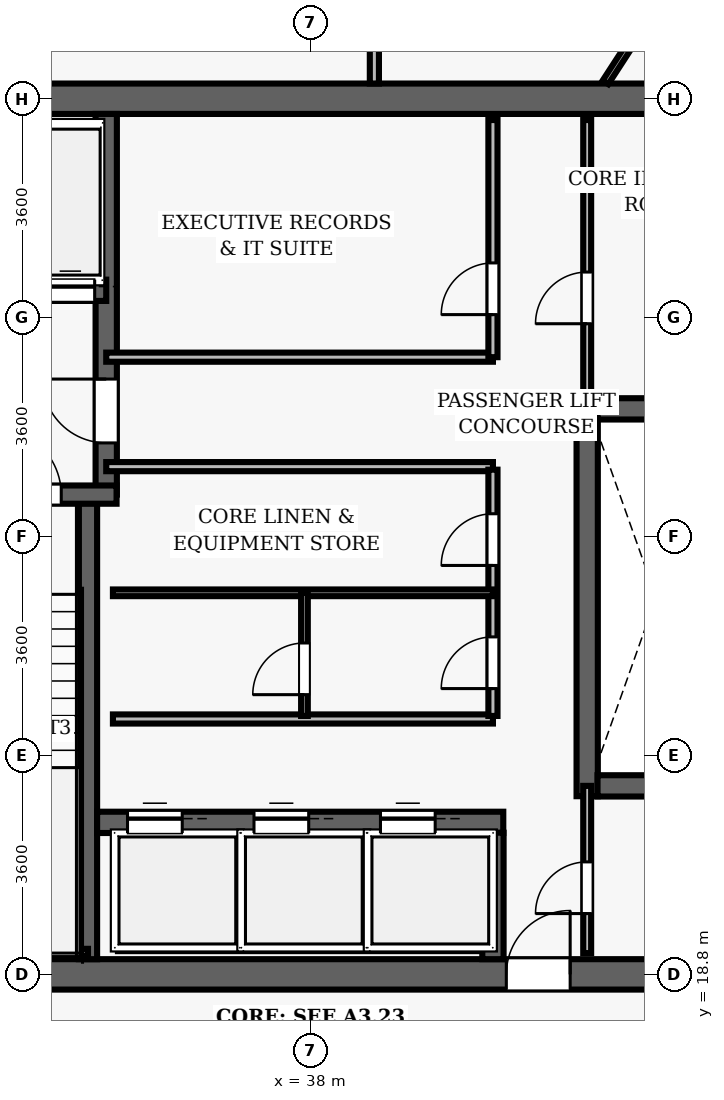
"""IFC4 building model, lengths in metres.
Left out: names, types, materials, properties, quantities, classifications, styles, units other than length and angle.
Written with IfcOpenShell. Run it as: python <this file> out.ifc"""

import sys

from ifc_helpers import new_model, si_unit, direction, frame, frame_2d, origin, place, context, subcontext, project, spatial, rectangle, extrude, element, fill, save


model = new_model("IFC4")
c1 = context("Model", 3, precision=1e-05, world=origin(), true_north=direction((0.0, 1.0)))
c2 = subcontext(c1, "Body", "Model", "MODEL_VIEW")
j1 = project(units=[si_unit("LENGTHUNIT", "METRE"), si_unit("PLANEANGLEUNIT", "RADIAN")], contexts=[c1])
p1 = place(None, origin())
s1 = spatial("IfcSite", under=j1, at=p1, CompositionType="ELEMENT")
p2 = place(p1, origin())
s2 = spatial("IfcBuilding", under=s1, at=p2, CompositionType="ELEMENT")
p3 = place(p2, frame((0.0, 0.0, 217.4)))
s3 = spatial("IfcBuildingStorey", under=s2, at=p3, CompositionType="ELEMENT", Elevation=217.4)
p4 = place(p3, frame((26.75, 18.8, 0.0), z_axis=(0.0, 0.0, 1.0), x_axis=(1.0, 0.0, 0.0)))
e1 = element("IfcWall", 1, at=p4, inside=s3, PredefinedType="SHEAR", context=c2, shape_type="SweptSolid", body=[
    extrude(rectangle(XDim=22.5, YDim=0.5, at=frame_2d((11.25, 0.0))), origin(), (0.0, 0.0, 1.0), 3.85),
])
p5 = place(p4, frame((14.47, 0.0, 0.0)))
e2 = element("IfcOpeningElement", 2, at=p5, cuts=e1, PredefinedType="OPENING", context=c2, shape_type="SweptSolid", body=[
    extrude(rectangle(XDim=1.05, YDim=2.15, at=frame_2d((0.525, 1.075))), frame((0.0, 0.26, 0.0), z_axis=(0.0, -1.0, 0.0), x_axis=(1.0, 0.0, 0.0)), (0.0, 0.0, 1.0), 0.52),
])
p6 = place(p3, frame((26.75, 33.2, 0.0), z_axis=(0.0, 0.0, 1.0), x_axis=(1.0, 0.0, 0.0)))
e3 = element("IfcWall", 3, at=p6, inside=s3, PredefinedType="SHEAR", context=c2, shape_type="SweptSolid", body=[
    extrude(rectangle(XDim=22.5, YDim=0.5, at=frame_2d((11.25, 0.0))), origin(), (0.0, 0.0, 1.0), 3.85),
])
p7 = place(p3, frame((34.34, 19.05, 0.0), z_axis=(0.0, 0.0, 1.0), x_axis=(0.0, 1.0, 0.0)))
e4 = element("IfcWall", 4, at=p7, inside=s3, PredefinedType="SHEAR", context=c2, shape_type="SweptSolid", body=[
    extrude(rectangle(XDim=7.5, YDim=0.3, at=frame_2d((3.75, 0.0))), origin(), (0.0, 0.0, 1.0), 3.85),
])
p8 = place(p3, frame((34.64, 26.69, 0.0), z_axis=(0.0, 0.0, 1.0), x_axis=(0.0, 1.0, 0.0)))
e5 = element("IfcWall", 5, at=p8, inside=s3, PredefinedType="SHEAR", context=c2, shape_type="SweptSolid", body=[
    extrude(rectangle(XDim=6.26, YDim=0.35, at=frame_2d((3.13, 0.0))), origin(), (0.0, 0.0, 1.0), 3.85),
])
p9 = place(p8, frame((0.85, 0.0, 0.0)))
e6 = element("IfcOpeningElement", 6, at=p9, cuts=e5, PredefinedType="OPENING", context=c2, shape_type="SweptSolid", body=[
    extrude(rectangle(XDim=1.05, YDim=2.15, at=frame_2d((0.525, 1.075))), frame((0.0, 0.185, 0.0), z_axis=(0.0, -1.0, 0.0), x_axis=(1.0, 0.0, 0.0)), (0.0, 0.0, 1.0), 0.37),
])
p10 = place(p3, frame((31.25, 26.69, 0.0), z_axis=(0.0, 0.0, 1.0), x_axis=(1.0, 0.0, 0.0)))
e7 = element("IfcWall", 7, at=p10, inside=s3, PredefinedType="SHEAR", context=c2, shape_type="SweptSolid", body=[
    extrude(rectangle(XDim=3.56, YDim=0.3, at=frame_2d((1.78, 0.0))), origin(), (0.0, 0.0, 1.0), 3.85),
])
p11 = place(p10, frame((1.55, 0.0, 0.0)))
e8 = element("IfcOpeningElement", 8, at=p11, cuts=e7, PredefinedType="OPENING", context=c2, shape_type="SweptSolid", body=[
    extrude(rectangle(XDim=1.1, YDim=2.15, at=frame_2d((0.55, 1.075))), frame((0.0, 0.16, 0.0), z_axis=(0.0, -1.0, 0.0), x_axis=(1.0, 0.0, 0.0)), (0.0, 0.0, 1.0), 0.32),
])
p12 = place(p3, frame((31.3, 19.16, 0.0), z_axis=(0.0, 0.0, 1.0), x_axis=(1.0, 0.0, 0.0)))
e9 = element("IfcWall", 9, at=p12, inside=s3, PredefinedType="SHEAR", context=c2, shape_type="SweptSolid", body=[
    extrude(rectangle(XDim=3.04, YDim=0.12, at=frame_2d((1.52, 0.0))), origin(), (0.0, 0.0, 1.0), 3.85),
])
p13 = place(p3, frame((32.23, 30.05, 0.0), z_axis=(0.0, 0.0, 1.0), x_axis=(1.0, 0.0, 0.0)))
e10 = element("IfcWall", 10, at=p13, inside=s3, PredefinedType="SHEAR", context=c2, shape_type="SweptSolid", body=[
    extrude(rectangle(XDim=2.41, YDim=0.35, at=frame_2d((1.205, 0.0))), origin(), (0.0, 0.0, 1.0), 3.035),
])
p14 = place(p13, frame((0.42, 0.0, 0.0)))
e11 = element("IfcOpeningElement", 11, at=p14, cuts=e10, PredefinedType="OPENING", context=c2, shape_type="SweptSolid", body=[
    extrude(rectangle(XDim=0.8, YDim=2.15, at=frame_2d((0.4, 1.075))), frame((0.0, 0.185, 0.0), z_axis=(0.0, -1.0, 0.0), x_axis=(1.0, 0.0, 0.0)), (0.0, 0.0, 1.0), 0.37),
])
p15 = place(p13, frame((1.42, 0.0, 0.0)))
e12 = element("IfcOpeningElement", 12, at=p15, cuts=e10, PredefinedType="OPENING", context=c2, shape_type="SweptSolid", body=[
    extrude(rectangle(XDim=0.8, YDim=2.15, at=frame_2d((0.4, 1.075))), frame((0.0, 0.185, 0.0), z_axis=(0.0, -1.0, 0.0), x_axis=(1.0, 0.0, 0.0)), (0.0, 0.0, 1.0), 0.37),
])
p16 = place(p3, frame((42.55, 21.73, 0.0), z_axis=(0.0, 0.0, 1.0), x_axis=(0.0, 1.0, 0.0)))
e13 = element("IfcWall", 13, at=p16, inside=s3, PredefinedType="SHEAR", context=c2, shape_type="SweptSolid", body=[
    extrude(rectangle(XDim=6.54, YDim=0.35, at=frame_2d((3.27, 0.0))), origin(), (0.0, 0.0, 1.0), 3.035),
])
for number, where, z_axis, x_axis in (
    (14, (42.72, 21.9, 0.0), (0.0, 0.0, 1.0), (1.0, 0.0, 0.0)),
    (15, (42.72, 28.1, 0.0), (0.0, 0.0, 1.0), (1.0, 0.0, 0.0)),
):
    element("IfcWall", number, at=place(p3, frame(where, z_axis=z_axis, x_axis=x_axis)), inside=s3, PredefinedType="SHEAR", context=c2, shape_type="SweptSolid", body=[
        extrude(rectangle(XDim=2.03, YDim=0.35, at=frame_2d((1.015, 0.0))), origin(), (0.0, 0.0, 1.0), 3.035),
    ])
p17 = place(p3, frame((34.49, 21.3, 0.0), z_axis=(0.0, 0.0, 1.0), x_axis=(1.0, 0.0, 0.0)))
e16 = element("IfcWall", 16, at=p17, inside=s3, PredefinedType="SHEAR", context=c2, shape_type="SweptSolid", body=[
    extrude(rectangle(XDim=6.68, YDim=0.35, at=frame_2d((3.34, 0.0))), origin(), (0.0, 0.0, 1.0), 3.035),
])
p18 = place(p17, frame((0.5, 0.0, 0.0)))
e17 = element("IfcOpeningElement", 17, at=p18, cuts=e16, PredefinedType="OPENING", context=c2, shape_type="SweptSolid", body=[
    extrude(rectangle(XDim=0.9, YDim=2.15, at=frame_2d((0.45, 1.075))), frame((0.0, 0.185, 0.0), z_axis=(0.0, -1.0, 0.0), x_axis=(1.0, 0.0, 0.0)), (0.0, 0.0, 1.0), 0.37),
])
p19 = place(p17, frame((2.58, 0.0, 0.0)))
e18 = element("IfcOpeningElement", 18, at=p19, cuts=e16, PredefinedType="OPENING", context=c2, shape_type="SweptSolid", body=[
    extrude(rectangle(XDim=0.9, YDim=2.15, at=frame_2d((0.45, 1.075))), frame((0.0, 0.185, 0.0), z_axis=(0.0, -1.0, 0.0), x_axis=(1.0, 0.0, 0.0)), (0.0, 0.0, 1.0), 0.37),
])
p20 = place(p17, frame((4.66, 0.0, 0.0)))
e19 = element("IfcOpeningElement", 19, at=p20, cuts=e16, PredefinedType="OPENING", context=c2, shape_type="SweptSolid", body=[
    extrude(rectangle(XDim=0.9, YDim=2.15, at=frame_2d((0.45, 1.075))), frame((0.0, 0.185, 0.0), z_axis=(0.0, -1.0, 0.0), x_axis=(1.0, 0.0, 0.0)), (0.0, 0.0, 1.0), 0.37),
])
p21 = place(p3, frame((41.0, 19.05, 0.0), z_axis=(0.0, 0.0, 1.0), x_axis=(0.0, 1.0, 0.0)))
e20 = element("IfcWall", 20, at=p21, inside=s3, PredefinedType="SHEAR", context=c2, shape_type="SweptSolid", body=[
    extrude(rectangle(XDim=2.08, YDim=0.35, at=frame_2d((1.04, 0.0))), origin(), (0.0, 0.0, 1.0), 3.035),
])
p22 = place(p3, frame((34.75, 23.0, 0.0), z_axis=(0.0, 0.0, 1.0), x_axis=(1.0, 0.0, 0.0)))
e21 = element("IfcWall", 21, at=p22, inside=s3, PredefinedType="PARTITIONING", context=c2, shape_type="SweptSolid", body=[
    extrude(rectangle(XDim=6.25, YDim=0.15, at=frame_2d((3.125, 0.0))), origin(), (0.0, 0.0, 1.0), 3.035),
])
for number, where, z_axis, x_axis in (
    (22, (34.64, 27.15, 0.0), (0.0, 0.0, 1.0), (1.0, 0.0, 0.0)),
    (23, (34.64, 28.95, 0.0), (0.0, 0.0, 1.0), (1.0, 0.0, 0.0)),
):
    element("IfcWall", number, at=place(p3, frame(where, z_axis=z_axis, x_axis=x_axis)), inside=s3, PredefinedType="PARTITIONING", context=c2, shape_type="SweptSolid", body=[
        extrude(rectangle(XDim=6.36, YDim=0.15, at=frame_2d((3.18, 0.0))), origin(), (0.0, 0.0, 1.0), 3.035),
    ])
p23 = place(p3, frame((41.0, 28.95, 0.0), z_axis=(0.0, 0.0, 1.0), x_axis=(0.0, 1.0, 0.0)))
e24 = element("IfcWall", 24, at=p23, inside=s3, PredefinedType="PARTITIONING", context=c2, shape_type="SweptSolid", body=[
    extrude(rectangle(XDim=3.9, YDim=0.15, at=frame_2d((1.95, 0.0))), origin(), (0.0, 0.0, 1.0), 3.035),
])
p24 = place(p23, frame((0.7, 0.0, 0.0)))
e25 = element("IfcOpeningElement", 25, at=p24, cuts=e24, PredefinedType="OPENING", context=c2, shape_type="SweptSolid", body=[
    extrude(rectangle(XDim=0.85, YDim=2.1, at=frame_2d((0.425, 1.05))), frame((0.0, 0.085, 0.0), z_axis=(0.0, -1.0, 0.0), x_axis=(1.0, 0.0, 0.0)), (0.0, 0.0, 1.0), 0.17),
])
p25 = place(p3, frame((41.0, 23.05, 0.0), z_axis=(0.0, 0.0, 1.0), x_axis=(0.0, 1.0, 0.0)))
e26 = element("IfcWall", 26, at=p25, inside=s3, PredefinedType="PARTITIONING", context=c2, shape_type="SweptSolid", body=[
    extrude(rectangle(XDim=4.05, YDim=0.15, at=frame_2d((2.025, 0.0))), origin(), (0.0, 0.0, 1.0), 3.035),
])
p26 = place(p25, frame((2.475, 0.0, 0.0)))
e27 = element("IfcOpeningElement", 27, at=p26, cuts=e26, PredefinedType="OPENING", context=c2, shape_type="SweptSolid", body=[
    extrude(rectangle(XDim=0.85, YDim=2.1, at=frame_2d((0.425, 1.05))), frame((0.0, 0.085, 0.0), z_axis=(0.0, -1.0, 0.0), x_axis=(1.0, 0.0, 0.0)), (0.0, 0.0, 1.0), 0.17),
])
p27 = place(p25, frame((0.45, 0.0, 0.0)))
e28 = element("IfcOpeningElement", 28, at=p27, cuts=e26, PredefinedType="OPENING", context=c2, shape_type="SweptSolid", body=[
    extrude(rectangle(XDim=0.85, YDim=2.1, at=frame_2d((0.425, 1.05))), frame((0.0, 0.085, 0.0), z_axis=(0.0, -1.0, 0.0), x_axis=(1.0, 0.0, 0.0)), (0.0, 0.0, 1.0), 0.17),
])
p28 = place(p3, frame((34.75, 25.075, 0.0), z_axis=(0.0, 0.0, 1.0), x_axis=(1.0, 0.0, 0.0)))
e29 = element("IfcWall", 29, at=p28, inside=s3, PredefinedType="PARTITIONING", context=c2, shape_type="SweptSolid", body=[
    extrude(rectangle(XDim=6.25, YDim=0.11, at=frame_2d((3.125, 0.0))), origin(), (0.0, 0.0, 1.0), 3.035),
])
p29 = place(p3, frame((37.9, 23.05, 0.0), z_axis=(0.0, 0.0, 1.0), x_axis=(0.0, 1.0, 0.0)))
e30 = element("IfcWall", 30, at=p29, inside=s3, PredefinedType="PARTITIONING", context=c2, shape_type="SweptSolid", body=[
    extrude(rectangle(XDim=2.025, YDim=0.11, at=frame_2d((1.012, 0.0))), origin(), (0.0, 0.0, 1.0), 3.035),
])
p30 = place(p29, frame((0.35, 0.0, 0.0)))
e31 = element("IfcOpeningElement", 31, at=p30, cuts=e30, PredefinedType="OPENING", context=c2, shape_type="SweptSolid", body=[
    extrude(rectangle(XDim=0.85, YDim=2.1, at=frame_2d((0.425, 1.05))), frame((0.0, 0.065, 0.0), z_axis=(0.0, -1.0, 0.0), x_axis=(1.0, 0.0, 0.0)), (0.0, 0.0, 1.0), 0.13),
])
p31 = place(p3, frame((42.55, 28.1, 0.0), z_axis=(0.0, 0.0, 1.0), x_axis=(0.0, 1.0, 0.0)))
e32 = element("IfcWall", 32, at=p31, inside=s3, PredefinedType="PARTITIONING", context=c2, shape_type="SweptSolid", body=[
    extrude(rectangle(XDim=4.75, YDim=0.13, at=frame_2d((2.375, 0.0))), origin(), (0.0, 0.0, 1.0), 3.035),
])
p32 = place(p31, frame((1.4, 0.0, 0.0)))
e33 = element("IfcOpeningElement", 33, at=p32, cuts=e32, PredefinedType="OPENING", context=c2, shape_type="SweptSolid", body=[
    extrude(rectangle(XDim=0.85, YDim=2.1, at=frame_2d((0.425, 1.05))), frame((0.0, 0.075, 0.0), z_axis=(0.0, -1.0, 0.0), x_axis=(1.0, 0.0, 0.0)), (0.0, 0.0, 1.0), 0.15),
])
p33 = place(p3, frame((42.55, 19.15, 0.0), z_axis=(0.0, 0.0, 1.0), x_axis=(0.0, 1.0, 0.0)))
e34 = element("IfcWall", 34, at=p33, inside=s3, PredefinedType="PARTITIONING", context=c2, shape_type="SweptSolid", body=[
    extrude(rectangle(XDim=2.75, YDim=0.13, at=frame_2d((1.375, 0.0))), origin(), (0.0, 0.0, 1.0), 3.035),
])
p34 = place(p33, frame((0.65, 0.0, 0.0)))
e35 = element("IfcOpeningElement", 35, at=p34, cuts=e34, PredefinedType="OPENING", context=c2, shape_type="SweptSolid", body=[
    extrude(rectangle(XDim=0.85, YDim=2.1, at=frame_2d((0.425, 1.05))), frame((0.0, 0.075, 0.0), z_axis=(0.0, -1.0, 0.0), x_axis=(1.0, 0.0, 0.0)), (0.0, 0.0, 1.0), 0.15),
])
p35 = place(p3, frame((39.05, 33.45, 0.0), z_axis=(0.0, 0.0, 1.0), x_axis=(0.0, 1.0, 0.0)))
e36 = element("IfcWall", 36, at=p35, inside=s3, PredefinedType="PARTITIONING", context=c2, shape_type="SweptSolid", body=[
    extrude(rectangle(XDim=6.95, YDim=0.15, at=frame_2d((3.475, 0.0))), origin(), (0.0, 0.0, 1.0), 3.035),
])
p36 = place(p35, frame((1.262, 0.0, 0.0)))
e37 = element("IfcOpeningElement", 37, at=p36, cuts=e36, PredefinedType="OPENING", context=c2, shape_type="SweptSolid", body=[
    extrude(rectangle(XDim=0.95, YDim=2.15, at=frame_2d((0.475, 1.075))), frame((0.0, 0.085, 0.0), z_axis=(0.0, -1.0, 0.0), x_axis=(1.0, 0.0, 0.0)), (0.0, 0.0, 1.0), 0.17),
])
p37 = place(p3, frame((42.851, 33.47, 0.0), z_axis=(0.0, 0.0, 1.0), x_axis=(0.544631367438, 0.838675547278, 0.0)))
e38 = element("IfcWall", 38, at=p37, inside=s3, PredefinedType="PARTITIONING", context=c2, shape_type="SweptSolid", body=[
    extrude(rectangle(XDim=12.646, YDim=0.11, at=frame_2d((6.323, 0.0))), origin(), (0.0, 0.0, 1.0), 3.035),
])
p38 = place(p11, origin())
e39 = element("IfcDoor", 39, at=p38, inside=s3, OperationType="SINGLE_SWING_LEFT", PredefinedType="DOOR", context=c2, shape_type="SweptSolid", body=[
    extrude(rectangle(XDim=1.1, YDim=2.15, at=frame_2d((0.55, 1.075))), frame((0.0, 0.025, 0.0), z_axis=(0.0, -1.0, 0.0), x_axis=(1.0, 0.0, 0.0)), (0.0, 0.0, 1.0), 0.05),
])
fill(e8, e39)
p39 = place(p5, origin())
e40 = element("IfcDoor", 40, at=p39, inside=s3, OperationType="SINGLE_SWING_RIGHT", PredefinedType="DOOR", context=c2, shape_type="SweptSolid", body=[
    extrude(rectangle(XDim=1.05, YDim=2.15, at=frame_2d((0.525, 1.075))), frame((0.0, 0.025, 0.0), z_axis=(0.0, -1.0, 0.0), x_axis=(1.0, 0.0, 0.0)), (0.0, 0.0, 1.0), 0.05),
])
fill(e2, e40)
p40 = place(p9, origin())
e41 = element("IfcDoor", 41, at=p40, inside=s3, OperationType="SINGLE_SWING_RIGHT", PredefinedType="DOOR", context=c2, shape_type="SweptSolid", body=[
    extrude(rectangle(XDim=1.05, YDim=2.15, at=frame_2d((0.525, 1.075))), frame((0.0, 0.025, 0.0), z_axis=(0.0, -1.0, 0.0), x_axis=(1.0, 0.0, 0.0)), (0.0, 0.0, 1.0), 0.05),
])
fill(e6, e41)
p41 = place(p24, origin())
e42 = element("IfcDoor", 42, at=p41, inside=s3, OperationType="SINGLE_SWING_LEFT", PredefinedType="DOOR", context=c2, shape_type="SweptSolid", body=[
    extrude(rectangle(XDim=0.85, YDim=2.1, at=frame_2d((0.425, 1.05))), frame((0.0, 0.025, 0.0), z_axis=(0.0, -1.0, 0.0), x_axis=(1.0, 0.0, 0.0)), (0.0, 0.0, 1.0), 0.05),
])
fill(e25, e42)
p42 = place(p26, origin())
e43 = element("IfcDoor", 43, at=p42, inside=s3, OperationType="SINGLE_SWING_LEFT", PredefinedType="DOOR", context=c2, shape_type="SweptSolid", body=[
    extrude(rectangle(XDim=0.85, YDim=2.1, at=frame_2d((0.425, 1.05))), frame((0.0, 0.025, 0.0), z_axis=(0.0, -1.0, 0.0), x_axis=(1.0, 0.0, 0.0)), (0.0, 0.0, 1.0), 0.05),
])
fill(e27, e43)
p43 = place(p27, origin())
e44 = element("IfcDoor", 44, at=p43, inside=s3, OperationType="SINGLE_SWING_LEFT", PredefinedType="DOOR", context=c2, shape_type="SweptSolid", body=[
    extrude(rectangle(XDim=0.85, YDim=2.1, at=frame_2d((0.425, 1.05))), frame((0.0, 0.025, 0.0), z_axis=(0.0, -1.0, 0.0), x_axis=(1.0, 0.0, 0.0)), (0.0, 0.0, 1.0), 0.05),
])
fill(e28, e44)
p44 = place(p30, origin())
e45 = element("IfcDoor", 45, at=p44, inside=s3, OperationType="SINGLE_SWING_LEFT", PredefinedType="DOOR", context=c2, shape_type="SweptSolid", body=[
    extrude(rectangle(XDim=0.85, YDim=2.1, at=frame_2d((0.425, 1.05))), frame((0.0, 0.025, 0.0), z_axis=(0.0, -1.0, 0.0), x_axis=(1.0, 0.0, 0.0)), (0.0, 0.0, 1.0), 0.05),
])
fill(e31, e45)
p45 = place(p32, origin())
e46 = element("IfcDoor", 46, at=p45, inside=s3, OperationType="SINGLE_SWING_LEFT", PredefinedType="DOOR", context=c2, shape_type="SweptSolid", body=[
    extrude(rectangle(XDim=0.85, YDim=2.1, at=frame_2d((0.425, 1.05))), frame((0.0, 0.025, 0.0), z_axis=(0.0, -1.0, 0.0), x_axis=(1.0, 0.0, 0.0)), (0.0, 0.0, 1.0), 0.05),
])
fill(e33, e46)
p46 = place(p34, origin())
e47 = element("IfcDoor", 47, at=p46, inside=s3, OperationType="SINGLE_SWING_LEFT", PredefinedType="DOOR", context=c2, shape_type="SweptSolid", body=[
    extrude(rectangle(XDim=0.85, YDim=2.1, at=frame_2d((0.425, 1.05))), frame((0.0, 0.025, 0.0), z_axis=(0.0, -1.0, 0.0), x_axis=(1.0, 0.0, 0.0)), (0.0, 0.0, 1.0), 0.05),
])
fill(e35, e47)
p47 = place(p18, origin())
e48 = element("IfcDoor", 48, at=p47, inside=s3, OperationType="SLIDING_TO_LEFT", PredefinedType="DOOR", context=c2, shape_type="SweptSolid", body=[
    extrude(rectangle(XDim=0.9, YDim=2.15, at=frame_2d((0.45, 1.075))), frame((0.0, 0.025, 0.0), z_axis=(0.0, -1.0, 0.0), x_axis=(1.0, 0.0, 0.0)), (0.0, 0.0, 1.0), 0.05),
])
fill(e17, e48)
p48 = place(p19, origin())
e49 = element("IfcDoor", 49, at=p48, inside=s3, OperationType="SLIDING_TO_LEFT", PredefinedType="DOOR", context=c2, shape_type="SweptSolid", body=[
    extrude(rectangle(XDim=0.9, YDim=2.15, at=frame_2d((0.45, 1.075))), frame((0.0, 0.025, 0.0), z_axis=(0.0, -1.0, 0.0), x_axis=(1.0, 0.0, 0.0)), (0.0, 0.0, 1.0), 0.05),
])
fill(e18, e49)
p49 = place(p20, origin())
e50 = element("IfcDoor", 50, at=p49, inside=s3, OperationType="SLIDING_TO_LEFT", PredefinedType="DOOR", context=c2, shape_type="SweptSolid", body=[
    extrude(rectangle(XDim=0.9, YDim=2.15, at=frame_2d((0.45, 1.075))), frame((0.0, 0.025, 0.0), z_axis=(0.0, -1.0, 0.0), x_axis=(1.0, 0.0, 0.0)), (0.0, 0.0, 1.0), 0.05),
])
fill(e19, e50)
p50 = place(p15, origin())
e51 = element("IfcDoor", 51, at=p50, inside=s3, OperationType="SLIDING_TO_LEFT", PredefinedType="DOOR", context=c2, shape_type="SweptSolid", body=[
    extrude(rectangle(XDim=0.8, YDim=2.15, at=frame_2d((0.4, 1.075))), frame((0.0, 0.025, 0.0), z_axis=(0.0, -1.0, 0.0), x_axis=(1.0, 0.0, 0.0)), (0.0, 0.0, 1.0), 0.05),
])
fill(e12, e51)
save(model, sys.argv[1])
